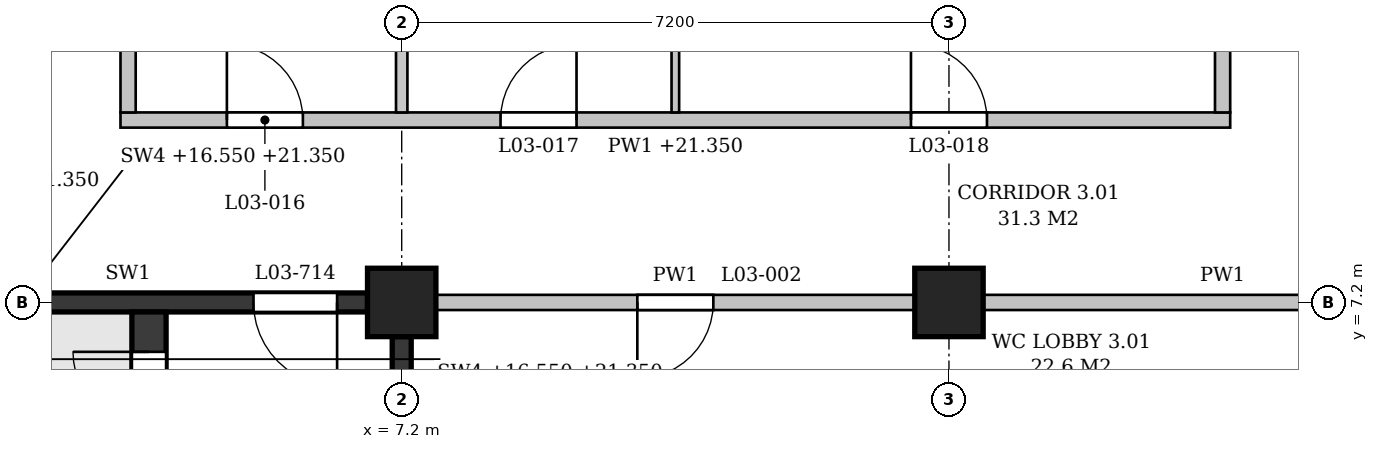
"""IFC4 building model, lengths in metres.
Left out: names, types, materials, properties, quantities, classifications, styles, units other than length and angle.
Written with IfcOpenShell. Run it as: python <this file> out.ifc"""

import sys

from ifc_helpers import new_model, si_unit, direction, frame, frame_2d, origin, origin_2d, place, context, subcontext, project, spatial, polyline, rectangle, outline, extrude, element, fill, save


model = new_model("IFC4")
c1 = context("Model", 3, precision=1e-05, world=origin(), true_north=direction((0.0, 1.0)))
c2 = subcontext(c1, "Body", "Model", "MODEL_VIEW")
j1 = project(units=[si_unit("LENGTHUNIT", "METRE"), si_unit("PLANEANGLEUNIT", "RADIAN")], contexts=[c1])
p1 = place(None, origin())
s1 = spatial("IfcSite", under=j1, at=p1, CompositionType="ELEMENT")
p2 = place(p1, origin())
s2 = spatial("IfcBuilding", under=s1, at=p2, CompositionType="ELEMENT")
p3 = place(p2, frame((0.0, 0.0, 16.8)))
s3 = spatial("IfcBuildingStorey", under=s2, at=p3, CompositionType="ELEMENT", Elevation=16.8)
for number, where, z_axis, x_axis in (
    (1, (7.2, 7.2, 0.0), (0.0, 0.0, 1.0), (1.0, 0.0, 0.0)),
    (2, (14.4, 7.2, 0.0), (0.0, 0.0, 1.0), (1.0, 0.0, 0.0)),
):
    element("IfcColumn", number, at=place(p3, frame(where, z_axis=z_axis, x_axis=x_axis)), inside=s3, PredefinedType="COLUMN", context=c2, shape_type="SweptSolid", body=[
        extrude(rectangle(XDim=0.9, YDim=0.9, at=origin_2d()), origin(), (0.0, 0.0, 1.0), 4.8),
    ])
p4 = place(p3, frame((0.45, 7.2, 0.0), z_axis=(0.0, 0.0, 1.0), x_axis=(1.0, 0.0, 0.0)))
e3 = element("IfcWall", 3, at=p4, inside=s3, PredefinedType="SHEAR", context=c2, shape_type="SweptSolid", body=[
    extrude(rectangle(XDim=6.3, YDim=0.25, at=frame_2d((3.15, 0.0))), origin(), (0.0, 0.0, 1.0), 3.8),
])
p5 = place(p4, frame((4.8, 0.0, 0.0)))
e4 = element("IfcOpeningElement", 4, at=p5, cuts=e3, PredefinedType="OPENING", context=c2, shape_type="SweptSolid", body=[
    extrude(rectangle(XDim=1.1, YDim=2.1, at=frame_2d((0.55, 1.05))), frame((0.0, 0.135, 0.0), z_axis=(0.0, -1.0, 0.0), x_axis=(1.0, 0.0, 0.0)), (0.0, 0.0, 1.0), 0.27),
])
p6 = place(p3, frame((7.2, 0.45, 0.0), z_axis=(0.0, 0.0, 1.0), x_axis=(0.0, 1.0, 0.0)))
e5 = element("IfcWall", 5, at=p6, inside=s3, PredefinedType="SHEAR", context=c2, shape_type="SweptSolid", body=[
    extrude(rectangle(XDim=6.3, YDim=0.25, at=frame_2d((3.15, 0.0))), origin(), (0.0, 0.0, 1.0), 3.8),
])
p7 = place(p3, frame((3.875, 0.225, 0.0), z_axis=(0.0, 0.0, 1.0), x_axis=(0.0, 1.0, 0.0)))
e6 = element("IfcWall", 6, at=p7, inside=s3, PredefinedType="SHEAR", context=c2, shape_type="SweptSolid", body=[
    extrude(rectangle(XDim=6.85, YDim=0.45, at=frame_2d((3.425, 0.0))), origin(), (0.0, 0.0, 1.0), 4.55),
])
p8 = place(p7, frame((5.325, 0.0, 0.0)))
e7 = element("IfcOpeningElement", 7, at=p8, cuts=e6, PredefinedType="OPENING", context=c2, shape_type="SweptSolid", body=[
    extrude(rectangle(XDim=1.0, YDim=2.1, at=frame_2d((0.5, 1.05))), frame((0.0, 0.235, 0.0), z_axis=(0.0, -1.0, 0.0), x_axis=(1.0, 0.0, 0.0)), (0.0, 0.0, 1.0), 0.47),
])
p9 = place(p3, frame((7.65, 7.2, 0.0), z_axis=(0.0, 0.0, 1.0), x_axis=(1.0, 0.0, 0.0)))
e8 = element("IfcWall", 8, at=p9, inside=s3, PredefinedType="PARTITIONING", context=c2, shape_type="SweptSolid", body=[
    extrude(rectangle(XDim=6.3, YDim=0.2, at=frame_2d((3.15, 0.0))), origin(), (0.0, 0.0, 1.0), 3.8),
])
p10 = place(p9, frame((2.65, 0.0, 0.0)))
e9 = element("IfcOpeningElement", 9, at=p10, cuts=e8, PredefinedType="OPENING", context=c2, shape_type="SweptSolid", body=[
    extrude(rectangle(XDim=1.0, YDim=2.1, at=frame_2d((0.5, 1.05))), frame((0.0, 0.11, 0.0), z_axis=(0.0, -1.0, 0.0), x_axis=(1.0, 0.0, 0.0)), (0.0, 0.0, 1.0), 0.22),
])
p11 = place(p3, frame((14.85, 7.2, 0.0), z_axis=(0.0, 0.0, 1.0), x_axis=(1.0, 0.0, 0.0)))
e10 = element("IfcWall", 10, at=p11, inside=s3, PredefinedType="PARTITIONING", context=c2, shape_type="SweptSolid", body=[
    extrude(rectangle(XDim=6.3, YDim=0.2, at=frame_2d((3.15, 0.0))), origin(), (0.0, 0.0, 1.0), 3.8),
])
p12 = place(p11, frame((4.225, 0.0, 0.0)))
e11 = element("IfcOpeningElement", 11, at=p12, cuts=e10, PredefinedType="OPENING", context=c2, shape_type="SweptSolid", body=[
    extrude(rectangle(XDim=1.0, YDim=2.1, at=frame_2d((0.5, 1.05))), frame((0.0, 0.11, 0.0), z_axis=(0.0, -1.0, 0.0), x_axis=(1.0, 0.0, 0.0)), (0.0, 0.0, 1.0), 0.22),
])
p13 = place(p3, frame((3.5, 9.6, 0.0), z_axis=(0.0, 0.0, 1.0), x_axis=(1.0, 0.0, 0.0)))
e12 = element("IfcWall", 12, at=p13, inside=s3, PredefinedType="PARTITIONING", context=c2, shape_type="SweptSolid", body=[
    extrude(outline(polyline([(0.0, 0.0), (14.6, 0.0), (14.6, 4.55), (11.15, 4.55), (11.15, 3.8), (10.65, 3.8), (10.65, 4.55), (3.95, 4.55), (3.95, 3.8), (3.45, 3.8), (3.45, 4.55), (0.0, 4.55), (0.0, 0.0)])), frame((0.0, 0.1, 0.0), z_axis=(0.0, -1.0, 0.0), x_axis=(1.0, 0.0, 0.0)), (0.0, 0.0, 1.0), 0.2),
])
p14 = place(p13, frame((1.4, 0.0, 0.0)))
e13 = element("IfcOpeningElement", 13, at=p14, cuts=e12, PredefinedType="OPENING", context=c2, shape_type="SweptSolid", body=[
    extrude(rectangle(XDim=1.0, YDim=2.1, at=frame_2d((0.5, 1.05))), frame((0.0, 0.11, 0.0), z_axis=(0.0, -1.0, 0.0), x_axis=(1.0, 0.0, 0.0)), (0.0, 0.0, 1.0), 0.22),
])
p15 = place(p13, frame((5.0, 0.0, 0.0)))
e14 = element("IfcOpeningElement", 14, at=p15, cuts=e12, PredefinedType="OPENING", context=c2, shape_type="SweptSolid", body=[
    extrude(rectangle(XDim=1.0, YDim=2.1, at=frame_2d((0.5, 1.05))), frame((0.0, 0.11, 0.0), z_axis=(0.0, -1.0, 0.0), x_axis=(1.0, 0.0, 0.0)), (0.0, 0.0, 1.0), 0.22),
])
p16 = place(p13, frame((10.4, 0.0, 0.0)))
e15 = element("IfcOpeningElement", 15, at=p16, cuts=e12, PredefinedType="OPENING", context=c2, shape_type="SweptSolid", body=[
    extrude(rectangle(XDim=1.0, YDim=2.1, at=frame_2d((0.5, 1.05))), frame((0.0, 0.11, 0.0), z_axis=(0.0, -1.0, 0.0), x_axis=(1.0, 0.0, 0.0)), (0.0, 0.0, 1.0), 0.22),
])
p17 = place(p3, frame((3.6, 9.7, 0.0), z_axis=(0.0, 0.0, 1.0), x_axis=(0.0, 1.0, 0.0)))
e16 = element("IfcWall", 16, at=p17, inside=s3, PredefinedType="PARTITIONING", context=c2, shape_type="SweptSolid", body=[
    extrude(rectangle(XDim=1.1, YDim=0.2, at=frame_2d((0.55, 0.0))), origin(), (0.0, 0.0, 1.0), 4.55),
])
p18 = place(p3, frame((7.2, 9.7, 0.0), z_axis=(0.0, 0.0, 1.0), x_axis=(0.0, 1.0, 0.0)))
e17 = element("IfcWall", 17, at=p18, inside=s3, PredefinedType="PARTITIONING", context=c2, shape_type="SweptSolid", body=[
    extrude(rectangle(XDim=4.25, YDim=0.15, at=frame_2d((2.125, 0.0))), origin(), (0.0, 0.0, 1.0), 3.8),
])
p19 = place(p3, frame((10.8, 9.7, 0.0), z_axis=(0.0, 0.0, 1.0), x_axis=(0.0, 1.0, 0.0)))
e18 = element("IfcWall", 18, at=p19, inside=s3, PredefinedType="PARTITIONING", context=c2, shape_type="SweptSolid", body=[
    extrude(rectangle(XDim=3.5, YDim=0.1, at=frame_2d((1.75, 0.0))), origin(), (0.0, 0.0, 1.0), 3.8),
])
p20 = place(p3, frame((18.0, 9.7, 0.0), z_axis=(0.0, 0.0, 1.0), x_axis=(0.0, 1.0, 0.0)))
e19 = element("IfcWall", 19, at=p20, inside=s3, PredefinedType="PARTITIONING", context=c2, shape_type="SweptSolid", body=[
    extrude(outline(polyline([(0.0, 0.0), (7.1, 0.0), (7.1, 4.55), (4.95, 4.55), (4.95, 3.8), (4.45, 3.8), (4.45, 4.55), (0.0, 4.55), (0.0, 0.0)])), frame((0.0, 0.1, 0.0), z_axis=(0.0, -1.0, 0.0), x_axis=(1.0, 0.0, 0.0)), (0.0, 0.0, 1.0), 0.2),
])
p21 = place(p8, origin())
e20 = element("IfcDoor", 20, at=p21, inside=s3, OperationType="SINGLE_SWING_RIGHT", PredefinedType="DOOR", context=c2, shape_type="SweptSolid", body=[
    extrude(rectangle(XDim=1.0, YDim=2.1, at=frame_2d((0.5, 1.05))), frame((0.0, 0.025, 0.0), z_axis=(0.0, -1.0, 0.0), x_axis=(1.0, 0.0, 0.0)), (0.0, 0.0, 1.0), 0.05),
])
fill(e7, e20)
p22 = place(p5, frame((1.1, 0.0, 0.0), z_axis=(0.0, 0.0, 1.0), x_axis=(-1.0, 0.0, 0.0)))
e21 = element("IfcDoor", 21, at=p22, inside=s3, OperationType="SINGLE_SWING_LEFT", PredefinedType="DOOR", context=c2, shape_type="SweptSolid", body=[
    extrude(rectangle(XDim=1.1, YDim=2.1, at=frame_2d((0.55, 1.05))), frame((0.0, 0.025, 0.0), z_axis=(0.0, -1.0, 0.0), x_axis=(1.0, 0.0, 0.0)), (0.0, 0.0, 1.0), 0.05),
])
fill(e4, e21)
p23 = place(p10, frame((1.0, 0.0, 0.0), z_axis=(0.0, 0.0, 1.0), x_axis=(-1.0, 0.0, 0.0)))
e22 = element("IfcDoor", 22, at=p23, inside=s3, OperationType="SINGLE_SWING_RIGHT", PredefinedType="DOOR", context=c2, shape_type="SweptSolid", body=[
    extrude(rectangle(XDim=1.0, YDim=2.1, at=frame_2d((0.5, 1.05))), frame((0.0, 0.025, 0.0), z_axis=(0.0, -1.0, 0.0), x_axis=(1.0, 0.0, 0.0)), (0.0, 0.0, 1.0), 0.05),
])
fill(e9, e22)
p24 = place(p14, origin())
e23 = element("IfcDoor", 23, at=p24, inside=s3, OperationType="SINGLE_SWING_LEFT", PredefinedType="DOOR", context=c2, shape_type="SweptSolid", body=[
    extrude(rectangle(XDim=1.0, YDim=2.1, at=frame_2d((0.5, 1.05))), frame((0.0, 0.025, 0.0), z_axis=(0.0, -1.0, 0.0), x_axis=(1.0, 0.0, 0.0)), (0.0, 0.0, 1.0), 0.05),
])
fill(e13, e23)
p25 = place(p15, origin())
e24 = element("IfcDoor", 24, at=p25, inside=s3, OperationType="SINGLE_SWING_RIGHT", PredefinedType="DOOR", context=c2, shape_type="SweptSolid", body=[
    extrude(rectangle(XDim=1.0, YDim=2.1, at=frame_2d((0.5, 1.05))), frame((0.0, 0.025, 0.0), z_axis=(0.0, -1.0, 0.0), x_axis=(1.0, 0.0, 0.0)), (0.0, 0.0, 1.0), 0.05),
])
fill(e14, e24)
p26 = place(p16, origin())
e25 = element("IfcDoor", 25, at=p26, inside=s3, OperationType="SINGLE_SWING_LEFT", PredefinedType="DOOR", context=c2, shape_type="SweptSolid", body=[
    extrude(rectangle(XDim=1.0, YDim=2.1, at=frame_2d((0.5, 1.05))), frame((0.0, 0.025, 0.0), z_axis=(0.0, -1.0, 0.0), x_axis=(1.0, 0.0, 0.0)), (0.0, 0.0, 1.0), 0.05),
])
fill(e15, e25)
save(model, sys.argv[1])
